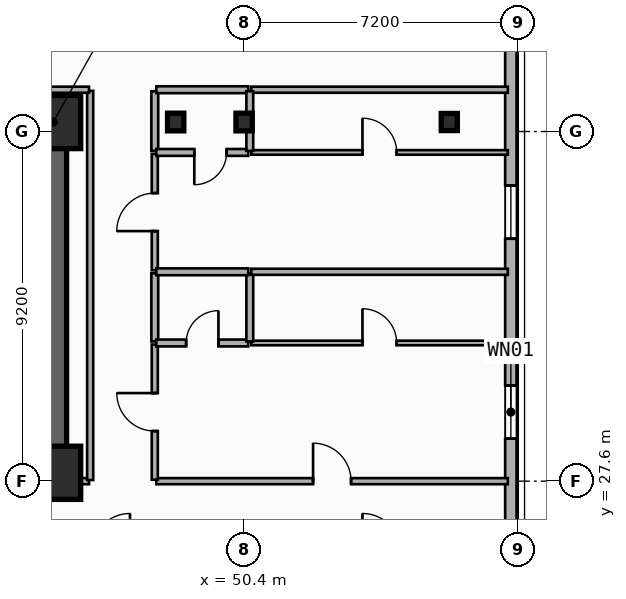
"""IFC4 building model, lengths in metres.
Left out: names, types, materials, properties, quantities, classifications, styles, units other than length and angle.
Written with IfcOpenShell. Run it as: python <this file> out.ifc"""

import sys

from ifc_helpers import new_model, si_unit, direction, frame, frame_2d, origin, origin_2d, place, context, subcontext, project, spatial, rectangle, i_section, extrude, element, fill, save


model = new_model("IFC4")
c1 = context("Model", 3, precision=1e-05, world=origin(), true_north=direction((0.0, 1.0)))
c2 = subcontext(c1, "Body", "Model", "MODEL_VIEW")
j1 = project(units=[si_unit("LENGTHUNIT", "METRE"), si_unit("PLANEANGLEUNIT", "RADIAN")], contexts=[c1])
p1 = place(None, origin())
s1 = spatial("IfcSite", under=j1, at=p1, CompositionType="ELEMENT")
p2 = place(p1, origin())
s2 = spatial("IfcBuilding", under=s1, at=p2, CompositionType="ELEMENT")
p3 = place(p2, frame((0.0, 0.0, 36.0)))
s3 = spatial("IfcBuildingStorey", under=s2, at=p3, CompositionType="ELEMENT", Elevation=36.0)
p4 = place(p3, frame((12.15, 37.05, 0.0), z_axis=(0.0, 0.0, 1.0), x_axis=(1.0, 0.0, 0.0)))
e1 = element("IfcWall", 1, at=p4, inside=s3, PredefinedType="SHEAR", context=c2, shape_type="SweptSolid", body=[
    extrude(rectangle(XDim=33.23, YDim=0.7, at=frame_2d((16.615, 0.0))), origin(), (0.0, 0.0, 1.0), 3.5),
])
p5 = place(p3, frame((45.38, 27.82, 0.0), z_axis=(0.0, 0.0, 1.0), x_axis=(-1.0, 0.0, 0.0)))
e2 = element("IfcWall", 2, at=p5, inside=s3, PredefinedType="SHEAR", context=c2, shape_type="SweptSolid", body=[
    extrude(rectangle(XDim=12.23, YDim=0.7, at=frame_2d((6.115, 0.0))), origin(), (0.0, 0.0, 1.0), 3.5),
])
p6 = place(p5, frame((9.93, 0.0, 0.0)))
e3 = element("IfcOpeningElement", 3, at=p6, cuts=e2, PredefinedType="OPENING", context=c2, shape_type="SweptSolid", body=[
    extrude(rectangle(XDim=1.1, YDim=2.15, at=frame_2d((0.55, 1.075))), frame((0.0, 0.36, 0.0), z_axis=(0.0, -1.0, 0.0), x_axis=(1.0, 0.0, 0.0)), (0.0, 0.0, 1.0), 0.72),
])
p7 = place(p5, frame((6.23, 0.0, 0.0)))
e4 = element("IfcOpeningElement", 4, at=p7, cuts=e2, PredefinedType="OPENING", context=c2, shape_type="SweptSolid", body=[
    extrude(rectangle(XDim=1.1, YDim=2.15, at=frame_2d((0.55, 1.075))), frame((0.0, 0.36, 0.0), z_axis=(0.0, -1.0, 0.0), x_axis=(1.0, 0.0, 0.0)), (0.0, 0.0, 1.0), 0.72),
])
p8 = place(p3, frame((45.38, 28.17, 0.0), z_axis=(0.0, 0.0, 1.0), x_axis=(0.0, 1.0, 0.0)))
e5 = element("IfcWall", 5, at=p8, inside=s3, PredefinedType="SHEAR", context=c2, shape_type="SweptSolid", body=[
    extrude(rectangle(XDim=8.53, YDim=0.7, at=frame_2d((4.265, 0.0))), origin(), (0.0, 0.0, 1.0), 3.5),
])
for number, where, z_axis, x_axis in (
    (6, (45.4, 27.82, 0.0), (0.0, 0.0, 1.0), (1.0, 0.0, 0.0)),
    (7, (45.4, 37.05, 0.0), (0.0, 0.0, 1.0), (1.0, 0.0, 0.0)),
):
    element("IfcColumn", number, at=place(p3, frame(where, z_axis=z_axis, x_axis=x_axis)), inside=s3, PredefinedType="COLUMN", context=c2, shape_type="SweptSolid", body=[
        extrude(rectangle(XDim=1.4, YDim=1.4, at=origin_2d()), origin(), (0.0, 0.0, 1.0), 3.5),
    ])
for number, where, z_axis, x_axis in (
    (8, (48.6, 37.05, 0.0), (0.0, 0.0, 1.0), (1.0, 0.0, 0.0)),
    (9, (50.4, 37.05, 0.0), (0.0, 0.0, 1.0), (1.0, 0.0, 0.0)),
):
    element("IfcColumn", number, at=place(p3, frame(where, z_axis=z_axis, x_axis=x_axis)), inside=s3, PredefinedType="COLUMN", context=c2, shape_type="SweptSolid", body=[
        extrude(i_section(OverallWidth=0.428, OverallDepth=0.465, WebThickness=0.045, FlangeThickness=0.073, FilletRadius=0.015, at=origin_2d()), origin(), (0.0, 0.0, 1.0), 3.5),
    ])
p9 = place(p3, frame((55.8, 37.05, 0.0), z_axis=(0.0, 0.0, 1.0), x_axis=(1.0, 0.0, 0.0)))
e10 = element("IfcColumn", 10, at=p9, inside=s3, PredefinedType="COLUMN", context=c2, shape_type="SweptSolid", body=[
    extrude(i_section(OverallWidth=0.424, OverallDepth=0.45, WebThickness=0.041, FlangeThickness=0.065, FilletRadius=0.015, at=origin_2d()), origin(), (0.0, 0.0, 1.0), 3.5),
])
p10 = place(p3, frame((57.42, 41.0, 0.0), z_axis=(0.0, 0.0, 1.0), x_axis=(0.0, -1.0, 0.0)))
e11 = element("IfcWall", 11, at=p10, inside=s3, PredefinedType="SOLIDWALL", context=c2, shape_type="SweptSolid", body=[
    extrude(rectangle(XDim=15.2, YDim=0.3, at=frame_2d((7.6, 0.0))), origin(), (0.0, 0.0, 1.0), 3.24),
])
p11 = place(p10, frame((10.882, 0.0, 0.48)))
e12 = element("IfcOpeningElement", 12, at=p11, cuts=e11, PredefinedType="OPENING", context=c2, shape_type="SweptSolid", body=[
    extrude(rectangle(XDim=1.4, YDim=1.8, at=frame_2d((0.7, 0.9))), frame((0.0, 0.16, 0.0), z_axis=(0.0, -1.0, 0.0), x_axis=(1.0, 0.0, 0.0)), (0.0, 0.0, 1.0), 0.32),
])
p12 = place(p10, frame((5.621, 0.0, 0.48)))
e13 = element("IfcOpeningElement", 13, at=p12, cuts=e11, PredefinedType="OPENING", context=c2, shape_type="SweptSolid", body=[
    extrude(rectangle(XDim=1.4, YDim=1.8, at=frame_2d((0.7, 0.9))), frame((0.0, 0.16, 0.0), z_axis=(0.0, -1.0, 0.0), x_axis=(1.0, 0.0, 0.0)), (0.0, 0.0, 1.0), 0.32),
])
p13 = place(p3, frame((48.09, 27.6, 0.0), z_axis=(0.0, 0.0, 1.0), x_axis=(1.0, 0.0, 0.0)))
e14 = element("IfcWall", 14, at=p13, inside=s3, PredefinedType="PARTITIONING", context=c2, shape_type="SweptSolid", body=[
    extrude(rectangle(XDim=9.25, YDim=0.16, at=frame_2d((4.625, 0.0))), origin(), (0.0, 0.0, 1.0), 2.57),
])
p14 = place(p13, frame((4.125, 0.0, 0.0)))
e15 = element("IfcOpeningElement", 15, at=p14, cuts=e14, PredefinedType="OPENING", context=c2, shape_type="SweptSolid", body=[
    extrude(rectangle(XDim=1.0, YDim=2.15, at=frame_2d((0.5, 1.075))), frame((0.0, 0.09, 0.0), z_axis=(0.0, -1.0, 0.0), x_axis=(1.0, 0.0, 0.0)), (0.0, 0.0, 1.0), 0.18),
])
p15 = place(p3, frame((48.05, 27.64, 0.0), z_axis=(0.0, 0.0, 1.0), x_axis=(0.0, 1.0, 0.0)))
e16 = element("IfcWall", 16, at=p15, inside=s3, PredefinedType="PARTITIONING", context=c2, shape_type="SweptSolid", body=[
    extrude(rectangle(XDim=3.556, YDim=0.16, at=frame_2d((1.778, 0.0))), origin(), (0.0, 0.0, 1.0), 3.24),
])
p16 = place(p15, frame((1.278, 0.0, 0.0)))
e17 = element("IfcOpeningElement", 17, at=p16, cuts=e16, PredefinedType="OPENING", context=c2, shape_type="SweptSolid", body=[
    extrude(rectangle(XDim=1.0, YDim=2.15, at=frame_2d((0.5, 1.075))), frame((0.0, 0.09, 0.0), z_axis=(0.0, -1.0, 0.0), x_axis=(1.0, 0.0, 0.0)), (0.0, 0.0, 1.0), 0.18),
])
p17 = place(p3, frame((48.05, 31.276, 0.0), z_axis=(0.0, 0.0, 1.0), x_axis=(0.0, 1.0, 0.0)))
e18 = element("IfcWall", 18, at=p17, inside=s3, PredefinedType="PLUMBINGWALL", context=c2, shape_type="SweptSolid", body=[
    extrude(rectangle(XDim=1.793, YDim=0.18, at=frame_2d((0.896, 0.0))), origin(), (0.0, 0.0, 1.0), 3.24),
])
p18 = place(p3, frame((48.05, 33.149, 0.0), z_axis=(0.0, 0.0, 1.0), x_axis=(0.0, 1.0, 0.0)))
e19 = element("IfcWall", 19, at=p18, inside=s3, PredefinedType="PARTITIONING", context=c2, shape_type="SweptSolid", body=[
    extrude(rectangle(XDim=3.061, YDim=0.16, at=frame_2d((1.531, 0.0))), origin(), (0.0, 0.0, 1.0), 3.24),
])
p19 = place(p18, frame((1.031, 0.0, 0.0)))
e20 = element("IfcOpeningElement", 20, at=p19, cuts=e19, PredefinedType="OPENING", context=c2, shape_type="SweptSolid", body=[
    extrude(rectangle(XDim=1.0, YDim=2.15, at=frame_2d((0.5, 1.075))), frame((0.0, 0.09, 0.0), z_axis=(0.0, -1.0, 0.0), x_axis=(1.0, 0.0, 0.0)), (0.0, 0.0, 1.0), 0.18),
])
p20 = place(p3, frame((48.05, 36.29, 0.0), z_axis=(0.0, 0.0, 1.0), x_axis=(0.0, 1.0, 0.0)))
e21 = element("IfcWall", 21, at=p20, inside=s3, PredefinedType="PLUMBINGWALL", context=c2, shape_type="SweptSolid", body=[
    extrude(rectangle(XDim=1.57, YDim=0.18, at=frame_2d((0.785, 0.0))), origin(), (0.0, 0.0, 1.0), 2.72),
])
p21 = place(p3, frame((48.09, 37.9, 0.0), z_axis=(0.0, 0.0, 1.0), x_axis=(1.0, 0.0, 0.0)))
e22 = element("IfcWall", 22, at=p21, inside=s3, PredefinedType="PLUMBINGWALL", context=c2, shape_type="SweptSolid", body=[
    extrude(rectangle(XDim=2.42, YDim=0.18, at=frame_2d((1.21, 0.0))), origin(), (0.0, 0.0, 1.0), 3.24),
])
p22 = place(p3, frame((50.59, 37.9, 0.0), z_axis=(0.0, 0.0, 1.0), x_axis=(1.0, 0.0, 0.0)))
e23 = element("IfcWall", 23, at=p22, inside=s3, PredefinedType="PARTITIONING", context=c2, shape_type="SweptSolid", body=[
    extrude(rectangle(XDim=6.75, YDim=0.16, at=frame_2d((3.375, 0.0))), origin(), (0.0, 0.0, 1.0), 3.24),
])
p23 = place(p3, frame((48.09, 31.236, 0.0), z_axis=(0.0, 0.0, 1.0), x_axis=(1.0, 0.0, 0.0)))
e24 = element("IfcWall", 24, at=p23, inside=s3, PredefinedType="PLUMBINGWALL", context=c2, shape_type="SweptSolid", body=[
    extrude(rectangle(XDim=2.42, YDim=0.18, at=frame_2d((1.21, 0.0))), origin(), (0.0, 0.0, 1.0), 2.57),
])
p24 = place(p23, frame((0.785, 0.0, 0.0)))
e25 = element("IfcOpeningElement", 25, at=p24, cuts=e24, PredefinedType="OPENING", context=c2, shape_type="SweptSolid", body=[
    extrude(rectangle(XDim=0.85, YDim=2.1, at=frame_2d((0.425, 1.05))), frame((0.0, 0.1, 0.0), z_axis=(0.0, -1.0, 0.0), x_axis=(1.0, 0.0, 0.0)), (0.0, 0.0, 1.0), 0.2),
])
p25 = place(p3, frame((50.59, 31.236, 0.0), z_axis=(0.0, 0.0, 1.0), x_axis=(1.0, 0.0, 0.0)))
e26 = element("IfcWall", 26, at=p25, inside=s3, PredefinedType="PARTITIONING", context=c2, shape_type="SweptSolid", body=[
    extrude(rectangle(XDim=6.75, YDim=0.12, at=frame_2d((3.375, 0.0))), origin(), (0.0, 0.0, 1.0), 2.57),
])
p26 = place(p25, frame((2.925, 0.0, 0.0)))
e27 = element("IfcOpeningElement", 27, at=p26, cuts=e26, PredefinedType="OPENING", context=c2, shape_type="SweptSolid", body=[
    extrude(rectangle(XDim=0.9, YDim=2.1, at=frame_2d((0.45, 1.05))), frame((0.0, 0.07, 0.0), z_axis=(0.0, -1.0, 0.0), x_axis=(1.0, 0.0, 0.0)), (0.0, 0.0, 1.0), 0.14),
])
p27 = place(p3, frame((50.55, 31.276, 0.0), z_axis=(0.0, 0.0, 1.0), x_axis=(0.0, 1.0, 0.0)))
e28 = element("IfcWall", 28, at=p27, inside=s3, PredefinedType="PLUMBINGWALL", context=c2, shape_type="SweptSolid", body=[
    extrude(rectangle(XDim=1.793, YDim=0.18, at=frame_2d((0.896, 0.0))), origin(), (0.0, 0.0, 1.0), 2.57),
])
p28 = place(p3, frame((48.09, 33.109, 0.0), z_axis=(0.0, 0.0, 1.0), x_axis=(1.0, 0.0, 0.0)))
e29 = element("IfcWall", 29, at=p28, inside=s3, PredefinedType="PLUMBINGWALL", context=c2, shape_type="SweptSolid", body=[
    extrude(rectangle(XDim=2.42, YDim=0.18, at=frame_2d((1.21, 0.0))), origin(), (0.0, 0.0, 1.0), 2.57),
])
p29 = place(p3, frame((50.59, 33.109, 0.0), z_axis=(0.0, 0.0, 1.0), x_axis=(1.0, 0.0, 0.0)))
e30 = element("IfcWall", 30, at=p29, inside=s3, PredefinedType="PARTITIONING", context=c2, shape_type="SweptSolid", body=[
    extrude(rectangle(XDim=6.75, YDim=0.16, at=frame_2d((3.375, 0.0))), origin(), (0.0, 0.0, 1.0), 2.57),
])
p30 = place(p3, frame((50.51, 36.25, 0.0), z_axis=(0.0, 0.0, 1.0), x_axis=(-1.0, 0.0, 0.0)))
e31 = element("IfcWall", 31, at=p30, inside=s3, PredefinedType="PLUMBINGWALL", context=c2, shape_type="SweptSolid", body=[
    extrude(rectangle(XDim=2.42, YDim=0.18, at=frame_2d((1.21, 0.0))), origin(), (0.0, 0.0, 1.0), 2.57),
])
p31 = place(p30, frame((0.57, 0.0, 0.0)))
e32 = element("IfcOpeningElement", 32, at=p31, cuts=e31, PredefinedType="OPENING", context=c2, shape_type="SweptSolid", body=[
    extrude(rectangle(XDim=0.85, YDim=2.1, at=frame_2d((0.425, 1.05))), frame((0.0, 0.1, 0.0), z_axis=(0.0, -1.0, 0.0), x_axis=(1.0, 0.0, 0.0)), (0.0, 0.0, 1.0), 0.2),
])
p32 = place(p3, frame((50.59, 36.25, 0.0), z_axis=(0.0, 0.0, 1.0), x_axis=(1.0, 0.0, 0.0)))
e33 = element("IfcWall", 33, at=p32, inside=s3, PredefinedType="PARTITIONING", context=c2, shape_type="SweptSolid", body=[
    extrude(rectangle(XDim=6.75, YDim=0.12, at=frame_2d((3.375, 0.0))), origin(), (0.0, 0.0, 1.0), 2.57),
])
p33 = place(p32, frame((2.925, 0.0, 0.0)))
e34 = element("IfcOpeningElement", 34, at=p33, cuts=e33, PredefinedType="OPENING", context=c2, shape_type="SweptSolid", body=[
    extrude(rectangle(XDim=0.9, YDim=2.1, at=frame_2d((0.45, 1.05))), frame((0.0, 0.07, 0.0), z_axis=(0.0, -1.0, 0.0), x_axis=(1.0, 0.0, 0.0)), (0.0, 0.0, 1.0), 0.14),
])
p34 = place(p3, frame((50.55, 36.29, 0.0), z_axis=(0.0, 0.0, 1.0), x_axis=(0.0, 1.0, 0.0)))
e35 = element("IfcWall", 35, at=p34, inside=s3, PredefinedType="PLUMBINGWALL", context=c2, shape_type="SweptSolid", body=[
    extrude(rectangle(XDim=1.57, YDim=0.18, at=frame_2d((0.785, 0.0))), origin(), (0.0, 0.0, 1.0), 2.57),
])
p35 = place(p3, frame((45.41, 27.6, 0.0), z_axis=(0.0, 0.0, 1.0), x_axis=(1.0, 0.0, 0.0)))
e36 = element("IfcWall", 36, at=p35, inside=s3, PredefinedType="PARTITIONING", context=c2, shape_type="SweptSolid", body=[
    extrude(rectangle(XDim=0.91, YDim=0.16, at=frame_2d((0.455, 0.0))), origin(), (0.0, 0.0, 1.0), 2.28),
])
p36 = place(p3, frame((46.35, 27.63, 0.0), z_axis=(0.0, 0.0, 1.0), x_axis=(0.0, 1.0, 0.0)))
e37 = element("IfcWall", 37, at=p36, inside=s3, PredefinedType="PARTITIONING", context=c2, shape_type="SweptSolid", body=[
    extrude(rectangle(XDim=10.24, YDim=0.16, at=frame_2d((5.12, 0.0))), origin(), (0.0, 0.0, 1.0), 2.72),
])
p37 = place(p3, frame((11.28, 37.9, 0.0), z_axis=(0.0, 0.0, 1.0), x_axis=(1.0, 0.0, 0.0)))
e38 = element("IfcWall", 38, at=p37, inside=s3, PredefinedType="PARTITIONING", context=c2, shape_type="SweptSolid", body=[
    extrude(rectangle(XDim=35.04, YDim=0.16, at=frame_2d((17.52, 0.0))), origin(), (0.0, 0.0, 1.0), 3.24),
])
p38 = place(p11, origin())
e39 = element("IfcWindow", 39, at=p38, inside=s3, PartitioningType="SINGLE_PANEL", PredefinedType="WINDOW", context=c2, shape_type="SweptSolid", body=[
    extrude(rectangle(XDim=1.4, YDim=1.8, at=frame_2d((0.7, 0.9))), frame((0.0, 0.03, 0.0), z_axis=(0.0, -1.0, 0.0), x_axis=(1.0, 0.0, 0.0)), (0.0, 0.0, 1.0), 0.06),
])
fill(e12, e39)
p39 = place(p12, origin())
e40 = element("IfcWindow", 40, at=p39, inside=s3, PartitioningType="SINGLE_PANEL", PredefinedType="WINDOW", context=c2, shape_type="SweptSolid", body=[
    extrude(rectangle(XDim=1.4, YDim=1.8, at=frame_2d((0.7, 0.9))), frame((0.0, 0.03, 0.0), z_axis=(0.0, -1.0, 0.0), x_axis=(1.0, 0.0, 0.0)), (0.0, 0.0, 1.0), 0.06),
])
fill(e13, e40)
p40 = place(p14, origin())
e41 = element("IfcDoor", 41, at=p40, inside=s3, OperationType="SINGLE_SWING_LEFT", PredefinedType="DOOR", context=c2, shape_type="SweptSolid", body=[
    extrude(rectangle(XDim=1.0, YDim=2.15, at=frame_2d((0.5, 1.075))), frame((0.0, 0.025, 0.0), z_axis=(0.0, -1.0, 0.0), x_axis=(1.0, 0.0, 0.0)), (0.0, 0.0, 1.0), 0.05),
])
fill(e15, e41)
p41 = place(p16, origin())
e42 = element("IfcDoor", 42, at=p41, inside=s3, OperationType="SINGLE_SWING_RIGHT", PredefinedType="DOOR", context=c2, shape_type="SweptSolid", body=[
    extrude(rectangle(XDim=1.0, YDim=2.15, at=frame_2d((0.5, 1.075))), frame((0.0, 0.025, 0.0), z_axis=(0.0, -1.0, 0.0), x_axis=(1.0, 0.0, 0.0)), (0.0, 0.0, 1.0), 0.05),
])
fill(e17, e42)
p42 = place(p19, origin())
e43 = element("IfcDoor", 43, at=p42, inside=s3, OperationType="SINGLE_SWING_LEFT", PredefinedType="DOOR", context=c2, shape_type="SweptSolid", body=[
    extrude(rectangle(XDim=1.0, YDim=2.15, at=frame_2d((0.5, 1.075))), frame((0.0, 0.025, 0.0), z_axis=(0.0, -1.0, 0.0), x_axis=(1.0, 0.0, 0.0)), (0.0, 0.0, 1.0), 0.05),
])
fill(e20, e43)
p43 = place(p24, origin())
e44 = element("IfcDoor", 44, at=p43, inside=s3, OperationType="SINGLE_SWING_RIGHT", PredefinedType="DOOR", context=c2, shape_type="SweptSolid", body=[
    extrude(rectangle(XDim=0.85, YDim=2.1, at=frame_2d((0.425, 1.05))), frame((0.0, 0.025, 0.0), z_axis=(0.0, -1.0, 0.0), x_axis=(1.0, 0.0, 0.0)), (0.0, 0.0, 1.0), 0.05),
])
fill(e25, e44)
p44 = place(p26, origin())
e45 = element("IfcDoor", 45, at=p44, inside=s3, OperationType="SINGLE_SWING_LEFT", PredefinedType="DOOR", context=c2, shape_type="SweptSolid", body=[
    extrude(rectangle(XDim=0.9, YDim=2.1, at=frame_2d((0.45, 1.05))), frame((0.0, 0.025, 0.0), z_axis=(0.0, -1.0, 0.0), x_axis=(1.0, 0.0, 0.0)), (0.0, 0.0, 1.0), 0.05),
])
fill(e27, e45)
p45 = place(p31, origin())
e46 = element("IfcDoor", 46, at=p45, inside=s3, OperationType="SINGLE_SWING_RIGHT", PredefinedType="DOOR", context=c2, shape_type="SweptSolid", body=[
    extrude(rectangle(XDim=0.85, YDim=2.1, at=frame_2d((0.425, 1.05))), frame((0.0, 0.025, 0.0), z_axis=(0.0, -1.0, 0.0), x_axis=(1.0, 0.0, 0.0)), (0.0, 0.0, 1.0), 0.05),
])
fill(e32, e46)
p46 = place(p33, origin())
e47 = element("IfcDoor", 47, at=p46, inside=s3, OperationType="SINGLE_SWING_LEFT", PredefinedType="DOOR", context=c2, shape_type="SweptSolid", body=[
    extrude(rectangle(XDim=0.9, YDim=2.1, at=frame_2d((0.45, 1.05))), frame((0.0, 0.025, 0.0), z_axis=(0.0, -1.0, 0.0), x_axis=(1.0, 0.0, 0.0)), (0.0, 0.0, 1.0), 0.05),
])
fill(e34, e47)
save(model, sys.argv[1])
